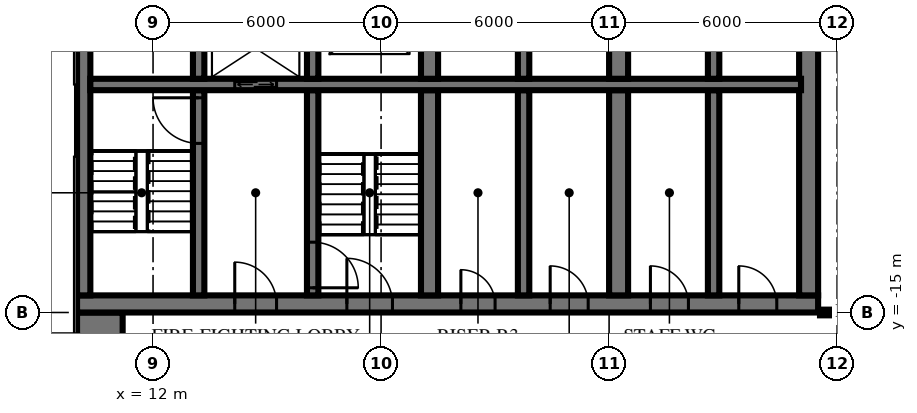
"""IFC4 building model, lengths in metres.
Left out: names, types, materials, properties, quantities, classifications, styles, units other than length and angle.
Written with IfcOpenShell. Run it as: python <this file> out.ifc"""

import sys

from ifc_helpers import new_model, si_unit, direction, frame, frame_2d, origin, place, context, subcontext, project, spatial, rectangle, extrude, element, fill, save


model = new_model("IFC4")
c1 = context("Model", 3, precision=1e-05, world=origin(), true_north=direction((0.0, 1.0)))
c2 = subcontext(c1, "Body", "Model", "MODEL_VIEW")
j1 = project(units=[si_unit("LENGTHUNIT", "METRE"), si_unit("PLANEANGLEUNIT", "RADIAN")], contexts=[c1])
p1 = place(None, origin())
s1 = spatial("IfcSite", under=j1, at=p1, CompositionType="ELEMENT")
p2 = place(p1, origin())
s2 = spatial("IfcBuilding", under=s1, at=p2, CompositionType="ELEMENT")
p3 = place(p2, frame((0.0, 0.0, 7.0)))
s3 = spatial("IfcBuildingStorey", under=s2, at=p3, CompositionType="ELEMENT", Elevation=7.0)
p4 = place(p3, frame((10.0, -14.775, 0.0), z_axis=(0.0, 0.0, 1.0), x_axis=(1.0, 0.0, 0.0)))
e1 = element("IfcWall", 1, at=p4, inside=s3, PredefinedType="SHEAR", context=c2, shape_type="SweptSolid", body=[
    extrude(rectangle(XDim=19.5, YDim=0.45, at=frame_2d((9.75, 0.0))), origin(), (0.0, 0.0, 1.0), 5.5),
])
p5 = place(p4, frame((7.1, 0.0, 0.0)))
e2 = element("IfcOpeningElement", 2, at=p5, cuts=e1, PredefinedType="OPENING", context=c2, shape_type="SweptSolid", body=[
    extrude(rectangle(XDim=1.2, YDim=2.1, at=frame_2d((0.6, 1.05))), frame((0.0, 0.235, 0.0), z_axis=(0.0, -1.0, 0.0), x_axis=(1.0, 0.0, 0.0)), (0.0, 0.0, 1.0), 0.47),
])
p6 = place(p4, frame((4.15, 0.0, 0.0)))
e3 = element("IfcOpeningElement", 3, at=p6, cuts=e1, PredefinedType="OPENING", context=c2, shape_type="SweptSolid", body=[
    extrude(rectangle(XDim=1.1, YDim=2.1, at=frame_2d((0.55, 1.05))), frame((0.0, 0.235, 0.0), z_axis=(0.0, -1.0, 0.0), x_axis=(1.0, 0.0, 0.0)), (0.0, 0.0, 1.0), 0.47),
])
p7 = place(p4, frame((10.1, 0.0, 0.0)))
e4 = element("IfcOpeningElement", 4, at=p7, cuts=e1, PredefinedType="OPENING", context=c2, shape_type="SweptSolid", body=[
    extrude(rectangle(XDim=0.9, YDim=2.1, at=frame_2d((0.45, 1.05))), frame((0.0, 0.235, 0.0), z_axis=(0.0, -1.0, 0.0), x_axis=(1.0, 0.0, 0.0)), (0.0, 0.0, 1.0), 0.47),
])
p8 = place(p4, frame((12.45, 0.0, 0.0)))
e5 = element("IfcOpeningElement", 5, at=p8, cuts=e1, PredefinedType="OPENING", context=c2, shape_type="SweptSolid", body=[
    extrude(rectangle(XDim=1.0, YDim=2.1, at=frame_2d((0.5, 1.05))), frame((0.0, 0.235, 0.0), z_axis=(0.0, -1.0, 0.0), x_axis=(1.0, 0.0, 0.0)), (0.0, 0.0, 1.0), 0.47),
])
p9 = place(p4, frame((15.087, 0.0, 0.0)))
e6 = element("IfcOpeningElement", 6, at=p9, cuts=e1, PredefinedType="OPENING", context=c2, shape_type="SweptSolid", body=[
    extrude(rectangle(XDim=1.0, YDim=2.1, at=frame_2d((0.5, 1.05))), frame((0.0, 0.235, 0.0), z_axis=(0.0, -1.0, 0.0), x_axis=(1.0, 0.0, 0.0)), (0.0, 0.0, 1.0), 0.47),
])
p10 = place(p4, frame((17.413, 0.0, 0.0)))
e7 = element("IfcOpeningElement", 7, at=p10, cuts=e1, PredefinedType="OPENING", context=c2, shape_type="SweptSolid", body=[
    extrude(rectangle(XDim=1.0, YDim=2.1, at=frame_2d((0.5, 1.05))), frame((0.0, 0.235, 0.0), z_axis=(0.0, -1.0, 0.0), x_axis=(1.0, 0.0, 0.0)), (0.0, 0.0, 1.0), 0.47),
])
p11 = place(p3, frame((10.175, -14.55, 0.0), z_axis=(0.0, 0.0, 1.0), x_axis=(0.0, 1.0, 0.0)))
e8 = element("IfcWall", 8, at=p11, inside=s3, PredefinedType="SHEAR", context=c2, shape_type="SweptSolid", body=[
    extrude(rectangle(XDim=14.1, YDim=0.35, at=frame_2d((7.05, 0.0))), origin(), (0.0, 0.0, 1.0), 5.5),
])
p12 = place(p3, frame((29.25, -14.55, 0.0), z_axis=(0.0, 0.0, 1.0), x_axis=(0.0, 1.0, 0.0)))
e9 = element("IfcWall", 9, at=p12, inside=s3, PredefinedType="SHEAR", context=c2, shape_type="SweptSolid", body=[
    extrude(rectangle(XDim=14.1, YDim=0.5, at=frame_2d((7.05, 0.0))), origin(), (0.0, 0.0, 1.0), 5.5),
])
p13 = place(p12, frame((8.4, 0.0, 0.0)))
e10 = element("IfcOpeningElement", 10, at=p13, cuts=e9, PredefinedType="OPENING", context=c2, shape_type="SweptSolid", body=[
    extrude(rectangle(XDim=1.4, YDim=2.4, at=frame_2d((0.7, 1.2))), frame((0.0, 0.26, 0.0), z_axis=(0.0, -1.0, 0.0), x_axis=(1.0, 0.0, 0.0)), (0.0, 0.0, 1.0), 0.52),
])
p14 = place(p12, frame((10.0, 0.0, 0.0)))
e11 = element("IfcOpeningElement", 11, at=p14, cuts=e9, PredefinedType="OPENING", context=c2, shape_type="SweptSolid", body=[
    extrude(rectangle(XDim=1.4, YDim=2.4, at=frame_2d((0.7, 1.2))), frame((0.0, 0.26, 0.0), z_axis=(0.0, -1.0, 0.0), x_axis=(1.0, 0.0, 0.0)), (0.0, 0.0, 1.0), 0.52),
])
p15 = place(p3, frame((10.35, -9.0, 0.0), z_axis=(0.0, 0.0, 1.0), x_axis=(1.0, 0.0, 0.0)))
e12 = element("IfcWall", 12, at=p15, inside=s3, PredefinedType="SHEAR", context=c2, shape_type="SweptSolid", body=[
    extrude(rectangle(XDim=18.7, YDim=0.3, at=frame_2d((9.35, 0.0))), origin(), (0.0, 0.0, 1.0), 5.5),
])
p16 = place(p15, frame((3.8, 0.0, 0.0)))
e13 = element("IfcOpeningElement", 13, at=p16, cuts=e12, PredefinedType="OPENING", context=c2, shape_type="SweptSolid", body=[
    extrude(rectangle(XDim=1.1, YDim=2.1, at=frame_2d((0.55, 1.05))), frame((0.0, 0.16, 0.0), z_axis=(0.0, -1.0, 0.0), x_axis=(1.0, 0.0, 0.0)), (0.0, 0.0, 1.0), 0.32),
])
p17 = place(p3, frame((13.2, -8.85, 0.0), z_axis=(0.0, 0.0, 1.0), x_axis=(0.0, 1.0, 0.0)))
e14 = element("IfcWall", 14, at=p17, inside=s3, PredefinedType="SHEAR", context=c2, shape_type="SweptSolid", body=[
    extrude(rectangle(XDim=2.3, YDim=0.3, at=frame_2d((1.15, 0.0))), origin(), (0.0, 0.0, 1.0), 5.5),
])
p18 = place(p3, frame((13.2, -14.55, 0.0), z_axis=(0.0, 0.0, 1.0), x_axis=(0.0, 1.0, 0.0)))
e15 = element("IfcWall", 15, at=p18, inside=s3, PredefinedType="SHEAR", context=c2, shape_type="SweptSolid", body=[
    extrude(rectangle(XDim=5.4, YDim=0.3, at=frame_2d((2.7, 0.0))), origin(), (0.0, 0.0, 1.0), 5.5),
])
p19 = place(p18, frame((4.0, 0.0, 0.0)))
e16 = element("IfcOpeningElement", 16, at=p19, cuts=e15, PredefinedType="OPENING", context=c2, shape_type="SweptSolid", body=[
    extrude(rectangle(XDim=1.2, YDim=2.1, at=frame_2d((0.6, 1.05))), frame((0.0, 0.16, 0.0), z_axis=(0.0, -1.0, 0.0), x_axis=(1.0, 0.0, 0.0)), (0.0, 0.0, 1.0), 0.32),
])
p20 = place(p3, frame((16.2, -8.85, 0.0), z_axis=(0.0, 0.0, 1.0), x_axis=(0.0, 1.0, 0.0)))
e17 = element("IfcWall", 17, at=p20, inside=s3, PredefinedType="SHEAR", context=c2, shape_type="SweptSolid", body=[
    extrude(rectangle(XDim=2.3, YDim=0.3, at=frame_2d((1.15, 0.0))), origin(), (0.0, 0.0, 1.0), 5.5),
])
p21 = place(p3, frame((16.2, -14.55, 0.0), z_axis=(0.0, 0.0, 1.0), x_axis=(0.0, 1.0, 0.0)))
e18 = element("IfcWall", 18, at=p21, inside=s3, PredefinedType="SHEAR", context=c2, shape_type="SweptSolid", body=[
    extrude(rectangle(XDim=5.4, YDim=0.3, at=frame_2d((2.7, 0.0))), origin(), (0.0, 0.0, 1.0), 5.5),
])
p22 = place(p21, frame((0.2, 0.0, 0.0)))
e19 = element("IfcOpeningElement", 19, at=p22, cuts=e18, PredefinedType="OPENING", context=c2, shape_type="SweptSolid", body=[
    extrude(rectangle(XDim=1.2, YDim=2.1, at=frame_2d((0.6, 1.05))), frame((0.0, 0.16, 0.0), z_axis=(0.0, -1.0, 0.0), x_axis=(1.0, 0.0, 0.0)), (0.0, 0.0, 1.0), 0.32),
])
p23 = place(p3, frame((19.275, -8.85, 0.0), z_axis=(0.0, 0.0, 1.0), x_axis=(0.0, 1.0, 0.0)))
e20 = element("IfcWall", 20, at=p23, inside=s3, PredefinedType="SHEAR", context=c2, shape_type="SweptSolid", body=[
    extrude(rectangle(XDim=2.3, YDim=0.45, at=frame_2d((1.15, 0.0))), origin(), (0.0, 0.0, 1.0), 5.5),
])
p24 = place(p3, frame((19.275, -14.55, 0.0), z_axis=(0.0, 0.0, 1.0), x_axis=(0.0, 1.0, 0.0)))
e21 = element("IfcWall", 21, at=p24, inside=s3, PredefinedType="SHEAR", context=c2, shape_type="SweptSolid", body=[
    extrude(rectangle(XDim=5.4, YDim=0.45, at=frame_2d((2.7, 0.0))), origin(), (0.0, 0.0, 1.0), 5.5),
])
p25 = place(p3, frame((21.75, -8.85, 0.0), z_axis=(0.0, 0.0, 1.0), x_axis=(0.0, 1.0, 0.0)))
e22 = element("IfcWall", 22, at=p25, inside=s3, PredefinedType="SHEAR", context=c2, shape_type="SweptSolid", body=[
    extrude(rectangle(XDim=2.3, YDim=0.3, at=frame_2d((1.15, 0.0))), origin(), (0.0, 0.0, 1.0), 5.5),
])
p26 = place(p3, frame((21.75, -14.55, 0.0), z_axis=(0.0, 0.0, 1.0), x_axis=(0.0, 1.0, 0.0)))
e23 = element("IfcWall", 23, at=p26, inside=s3, PredefinedType="SHEAR", context=c2, shape_type="SweptSolid", body=[
    extrude(rectangle(XDim=5.4, YDim=0.3, at=frame_2d((2.7, 0.0))), origin(), (0.0, 0.0, 1.0), 5.5),
])
p27 = place(p3, frame((24.25, -8.85, 0.0), z_axis=(0.0, 0.0, 1.0), x_axis=(0.0, 1.0, 0.0)))
e24 = element("IfcWall", 24, at=p27, inside=s3, PredefinedType="SHEAR", context=c2, shape_type="SweptSolid", body=[
    extrude(rectangle(XDim=2.3, YDim=0.5, at=frame_2d((1.15, 0.0))), origin(), (0.0, 0.0, 1.0), 5.5),
])
p28 = place(p3, frame((24.25, -14.55, 0.0), z_axis=(0.0, 0.0, 1.0), x_axis=(0.0, 1.0, 0.0)))
e25 = element("IfcWall", 25, at=p28, inside=s3, PredefinedType="SHEAR", context=c2, shape_type="SweptSolid", body=[
    extrude(rectangle(XDim=5.4, YDim=0.5, at=frame_2d((2.7, 0.0))), origin(), (0.0, 0.0, 1.0), 5.5),
])
p29 = place(p3, frame((26.75, -8.85, 0.0), z_axis=(0.0, 0.0, 1.0), x_axis=(0.0, 1.0, 0.0)))
e26 = element("IfcWall", 26, at=p29, inside=s3, PredefinedType="SHEAR", context=c2, shape_type="SweptSolid", body=[
    extrude(rectangle(XDim=2.3, YDim=0.3, at=frame_2d((1.15, 0.0))), origin(), (0.0, 0.0, 1.0), 5.5),
])
p30 = place(p3, frame((26.75, -14.55, 0.0), z_axis=(0.0, 0.0, 1.0), x_axis=(0.0, 1.0, 0.0)))
e27 = element("IfcWall", 27, at=p30, inside=s3, PredefinedType="SHEAR", context=c2, shape_type="SweptSolid", body=[
    extrude(rectangle(XDim=5.4, YDim=0.3, at=frame_2d((2.7, 0.0))), origin(), (0.0, 0.0, 1.0), 5.5),
])
p31 = place(p3, frame((10.6, -40.0, 0.0), z_axis=(0.0, 0.0, 1.0), x_axis=(0.0, 1.0, 0.0)))
e28 = element("IfcWall", 28, at=p31, inside=s3, PredefinedType="SHEAR", context=c2, shape_type="SweptSolid", body=[
    extrude(rectangle(XDim=25.0, YDim=1.2, at=frame_2d((12.5, 0.0))), origin(), (0.0, 0.0, 1.0), 5.5),
])
p32 = place(p3, frame((29.55, -15.0, 0.0), z_axis=(0.0, 0.0, 1.0), x_axis=(1.0, 0.0, 0.0)))
e29 = element("IfcWall", 29, at=p32, inside=s3, PredefinedType="PARTITIONING", context=c2, shape_type="SweptSolid", body=[
    extrude(rectangle(XDim=18.27, YDim=0.15, at=frame_2d((9.135, 0.0))), origin(), (0.0, 0.0, 1.0), 5.05),
])
p33 = place(p32, frame((15.65, 0.0, 0.0)))
e30 = element("IfcOpeningElement", 30, at=p33, cuts=e29, PredefinedType="OPENING", context=c2, shape_type="SweptSolid", body=[
    extrude(rectangle(XDim=1.0, YDim=2.1, at=frame_2d((0.5, 1.05))), frame((0.0, 0.085, 0.0), z_axis=(0.0, -1.0, 0.0), x_axis=(1.0, 0.0, 0.0)), (0.0, 0.0, 1.0), 0.17),
])
p34 = place(p32, frame((13.47, 0.0, 0.0)))
e31 = element("IfcOpeningElement", 31, at=p34, cuts=e29, PredefinedType="OPENING", context=c2, shape_type="SweptSolid", body=[
    extrude(rectangle(XDim=1.0, YDim=2.1, at=frame_2d((0.5, 1.05))), frame((0.0, 0.085, 0.0), z_axis=(0.0, -1.0, 0.0), x_axis=(1.0, 0.0, 0.0)), (0.0, 0.0, 1.0), 0.17),
])
p35 = place(p32, frame((8.97, 0.0, 0.0)))
e32 = element("IfcOpeningElement", 32, at=p35, cuts=e29, PredefinedType="OPENING", context=c2, shape_type="SweptSolid", body=[
    extrude(rectangle(XDim=1.0, YDim=2.1, at=frame_2d((0.5, 1.05))), frame((0.0, 0.085, 0.0), z_axis=(0.0, -1.0, 0.0), x_axis=(1.0, 0.0, 0.0)), (0.0, 0.0, 1.0), 0.17),
])
p36 = place(p32, frame((3.92, 0.0, 0.0)))
e33 = element("IfcOpeningElement", 33, at=p36, cuts=e29, PredefinedType="OPENING", context=c2, shape_type="SweptSolid", body=[
    extrude(rectangle(XDim=1.0, YDim=2.1, at=frame_2d((0.5, 1.05))), frame((0.0, 0.085, 0.0), z_axis=(0.0, -1.0, 0.0), x_axis=(1.0, 0.0, 0.0)), (0.0, 0.0, 1.0), 0.17),
])
p37 = place(p32, frame((0.65, 0.0, 0.0)))
e34 = element("IfcOpeningElement", 34, at=p37, cuts=e29, PredefinedType="OPENING", context=c2, shape_type="SweptSolid", body=[
    extrude(rectangle(XDim=1.0, YDim=2.1, at=frame_2d((0.5, 1.05))), frame((0.0, 0.085, 0.0), z_axis=(0.0, -1.0, 0.0), x_axis=(1.0, 0.0, 0.0)), (0.0, 0.0, 1.0), 0.17),
])
p38 = place(p16, origin())
e35 = element("IfcDoor", 35, at=p38, inside=s3, OperationType="DOUBLE_DOOR_SLIDING", PredefinedType="USERDEFINED", context=c2, shape_type="SweptSolid", body=[
    extrude(rectangle(XDim=1.1, YDim=2.1, at=frame_2d((0.55, 1.05))), frame((0.0, 0.025, 0.0), z_axis=(0.0, -1.0, 0.0), x_axis=(1.0, 0.0, 0.0)), (0.0, 0.0, 1.0), 0.05),
])
fill(e13, e35)
p39 = place(p5, origin())
e36 = element("IfcDoor", 36, at=p39, inside=s3, OperationType="SINGLE_SWING_RIGHT", PredefinedType="DOOR", context=c2, shape_type="SweptSolid", body=[
    extrude(rectangle(XDim=1.2, YDim=2.1, at=frame_2d((0.6, 1.05))), frame((0.0, 0.025, 0.0), z_axis=(0.0, -1.0, 0.0), x_axis=(1.0, 0.0, 0.0)), (0.0, 0.0, 1.0), 0.05),
])
fill(e2, e36)
p40 = place(p6, origin())
e37 = element("IfcDoor", 37, at=p40, inside=s3, OperationType="SINGLE_SWING_RIGHT", PredefinedType="DOOR", context=c2, shape_type="SweptSolid", body=[
    extrude(rectangle(XDim=1.1, YDim=2.1, at=frame_2d((0.55, 1.05))), frame((0.0, 0.025, 0.0), z_axis=(0.0, -1.0, 0.0), x_axis=(1.0, 0.0, 0.0)), (0.0, 0.0, 1.0), 0.05),
])
fill(e3, e37)
p41 = place(p7, origin())
e38 = element("IfcDoor", 38, at=p41, inside=s3, OperationType="SINGLE_SWING_RIGHT", PredefinedType="DOOR", context=c2, shape_type="SweptSolid", body=[
    extrude(rectangle(XDim=0.9, YDim=2.1, at=frame_2d((0.45, 1.05))), frame((0.0, 0.025, 0.0), z_axis=(0.0, -1.0, 0.0), x_axis=(1.0, 0.0, 0.0)), (0.0, 0.0, 1.0), 0.05),
])
fill(e4, e38)
p42 = place(p8, origin())
e39 = element("IfcDoor", 39, at=p42, inside=s3, OperationType="SINGLE_SWING_RIGHT", PredefinedType="DOOR", context=c2, shape_type="SweptSolid", body=[
    extrude(rectangle(XDim=1.0, YDim=2.1, at=frame_2d((0.5, 1.05))), frame((0.0, 0.025, 0.0), z_axis=(0.0, -1.0, 0.0), x_axis=(1.0, 0.0, 0.0)), (0.0, 0.0, 1.0), 0.05),
])
fill(e5, e39)
p43 = place(p9, origin())
e40 = element("IfcDoor", 40, at=p43, inside=s3, OperationType="SINGLE_SWING_RIGHT", PredefinedType="DOOR", context=c2, shape_type="SweptSolid", body=[
    extrude(rectangle(XDim=1.0, YDim=2.1, at=frame_2d((0.5, 1.05))), frame((0.0, 0.025, 0.0), z_axis=(0.0, -1.0, 0.0), x_axis=(1.0, 0.0, 0.0)), (0.0, 0.0, 1.0), 0.05),
])
fill(e6, e40)
p44 = place(p10, origin())
e41 = element("IfcDoor", 41, at=p44, inside=s3, OperationType="SINGLE_SWING_RIGHT", PredefinedType="DOOR", context=c2, shape_type="SweptSolid", body=[
    extrude(rectangle(XDim=1.0, YDim=2.1, at=frame_2d((0.5, 1.05))), frame((0.0, 0.025, 0.0), z_axis=(0.0, -1.0, 0.0), x_axis=(1.0, 0.0, 0.0)), (0.0, 0.0, 1.0), 0.05),
])
fill(e7, e41)
p45 = place(p19, origin())
e42 = element("IfcDoor", 42, at=p45, inside=s3, OperationType="SINGLE_SWING_LEFT", PredefinedType="DOOR", context=c2, shape_type="SweptSolid", body=[
    extrude(rectangle(XDim=1.2, YDim=2.1, at=frame_2d((0.6, 1.05))), frame((0.0, 0.025, 0.0), z_axis=(0.0, -1.0, 0.0), x_axis=(1.0, 0.0, 0.0)), (0.0, 0.0, 1.0), 0.05),
])
fill(e16, e42)
p46 = place(p22, frame((0.6, 0.0, 0.0), z_axis=(0.0, 0.0, 1.0), x_axis=(-1.0, 0.0, 0.0)))
e43 = element("IfcDoor", 43, at=p46, inside=s3, OperationType="SINGLE_SWING_LEFT", PredefinedType="DOOR", context=c2, shape_type="SweptSolid", body=[
    extrude(rectangle(XDim=1.2, YDim=2.1, at=frame_2d((0.0, 1.05))), frame((0.0, -0.025, 0.0), z_axis=(0.0, 1.0, 0.0), x_axis=(-1.0, 0.0, 0.0)), (0.0, 0.0, 1.0), 0.05),
])
fill(e19, e43)
save(model, sys.argv[1])
